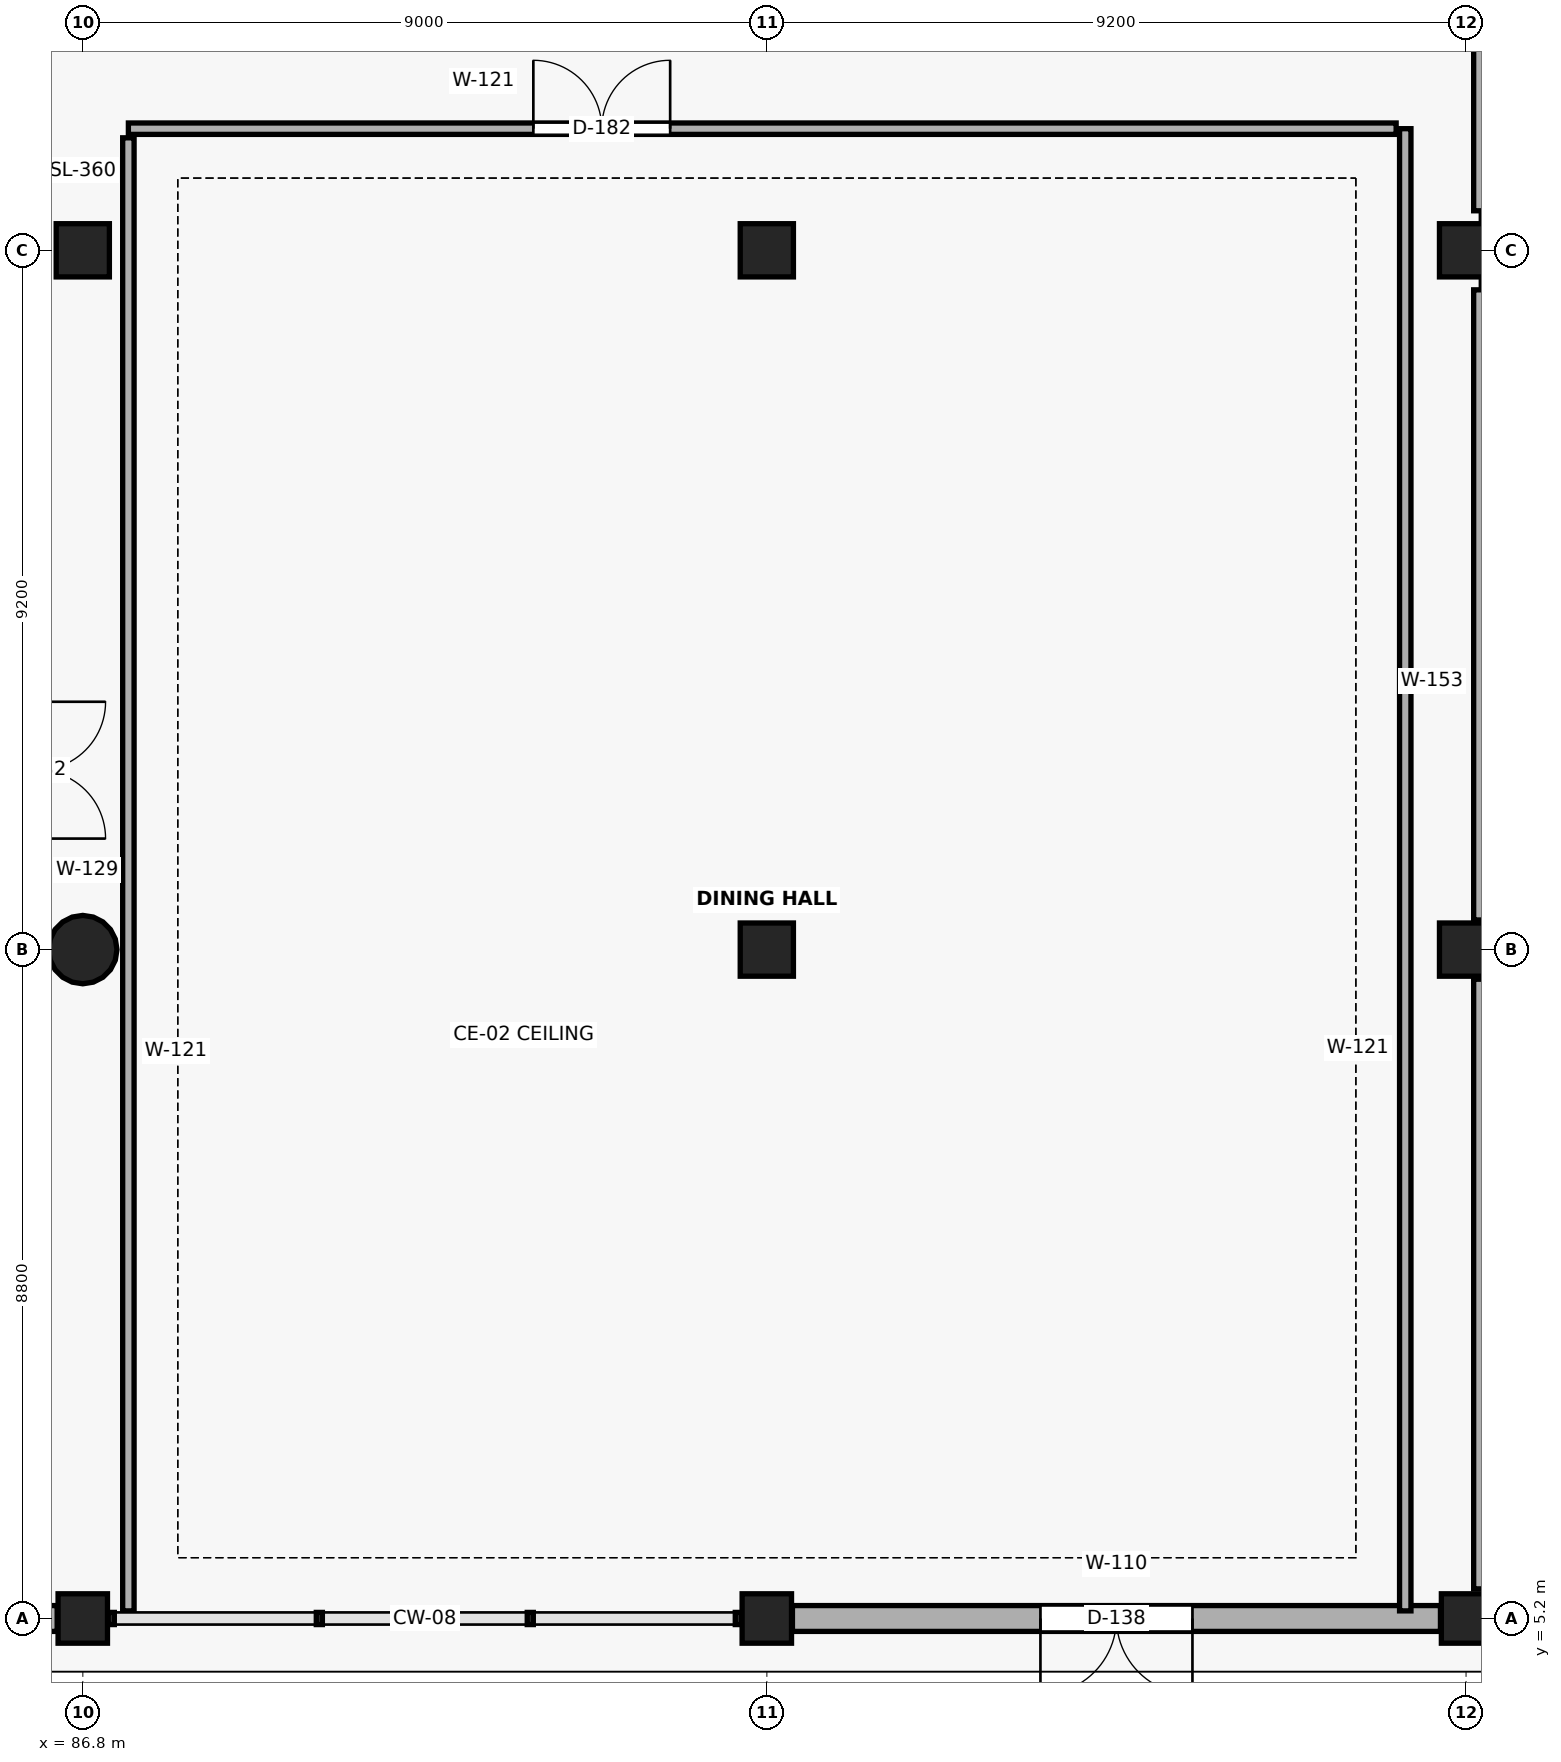
"""IFC4 building model, lengths in metres.
Left out: names, types, materials, properties, quantities, classifications, styles, units other than length and angle.
Written with IfcOpenShell. Run it as: python <this file> out.ifc"""

import sys

from ifc_helpers import new_model, si_unit, direction, frame, frame_2d, origin, origin_2d, place, context, subcontext, project, spatial, rectangle, circle, extrude, element, fill, save


model = new_model("IFC4")
c1 = context("Model", 3, precision=1e-05, world=origin(), true_north=direction((0.0, 1.0)))
c2 = subcontext(c1, "Body", "Model", "MODEL_VIEW")
j1 = project(units=[si_unit("LENGTHUNIT", "METRE"), si_unit("PLANEANGLEUNIT", "RADIAN")], contexts=[c1])
p1 = place(None, origin())
s1 = spatial("IfcSite", under=j1, at=p1, CompositionType="ELEMENT")
p2 = place(p1, origin())
s2 = spatial("IfcBuilding", under=s1, at=p2, CompositionType="ELEMENT")
p3 = place(p2, origin())
s3 = spatial("IfcBuildingStorey", under=s2, at=p3, CompositionType="ELEMENT", Elevation=0.0)
p4 = place(p3, frame((86.8, 5.2, 0.0), z_axis=(0.0, 0.0, 1.0), x_axis=(1.0, 0.0, 0.0)))
e1 = element("IfcColumn", 1, at=p4, inside=s3, PredefinedType="COLUMN", context=c2, shape_type="SweptSolid", body=[
    extrude(rectangle(XDim=0.65, YDim=0.65, at=origin_2d()), origin(), (0.0, 0.0, 1.0), 5.1),
])
p5 = place(p3, frame((86.8, 14.0, 0.0), z_axis=(0.0, 0.0, 1.0), x_axis=(1.0, 0.0, 0.0)))
e2 = element("IfcColumn", 2, at=p5, inside=s3, PredefinedType="COLUMN", context=c2, shape_type="SweptSolid", body=[
    extrude(circle(Radius=0.45, at=origin_2d()), origin(), (0.0, 0.0, 1.0), 5.1),
])
p6 = place(p3, frame((86.8, 23.2, 0.0), z_axis=(0.0, 0.0, 1.0), x_axis=(1.0, 0.0, 0.0)))
e3 = element("IfcColumn", 3, at=p6, inside=s3, PredefinedType="COLUMN", context=c2, shape_type="SweptSolid", body=[
    extrude(rectangle(XDim=0.7, YDim=0.7, at=origin_2d()), origin(), (0.0, 0.0, 1.0), 5.1),
])
p7 = place(p3, frame((95.8, 5.2, 0.0), z_axis=(0.0, 0.0, 1.0), x_axis=(1.0, 0.0, 0.0)))
e4 = element("IfcColumn", 4, at=p7, inside=s3, PredefinedType="COLUMN", context=c2, shape_type="SweptSolid", body=[
    extrude(rectangle(XDim=0.65, YDim=0.65, at=origin_2d()), origin(), (0.0, 0.0, 1.0), 5.1),
])
for number, where, z_axis, x_axis in (
    (5, (95.8, 14.0, 0.0), (0.0, 0.0, 1.0), (1.0, 0.0, 0.0)),
    (6, (95.8, 23.2, 0.0), (0.0, 0.0, 1.0), (1.0, 0.0, 0.0)),
):
    element("IfcColumn", number, at=place(p3, frame(where, z_axis=z_axis, x_axis=x_axis)), inside=s3, PredefinedType="COLUMN", context=c2, shape_type="SweptSolid", body=[
        extrude(rectangle(XDim=0.7, YDim=0.7, at=origin_2d()), origin(), (0.0, 0.0, 1.0), 5.1),
    ])
p8 = place(p3, frame((105.0, 5.2, 0.0), z_axis=(0.0, 0.0, 1.0), x_axis=(1.0, 0.0, 0.0)))
e7 = element("IfcColumn", 7, at=p8, inside=s3, PredefinedType="COLUMN", context=c2, shape_type="SweptSolid", body=[
    extrude(rectangle(XDim=0.65, YDim=0.65, at=origin_2d()), origin(), (0.0, 0.0, 1.0), 5.1),
])
for number, where, z_axis, x_axis in (
    (8, (105.0, 14.0, 0.0), (0.0, 0.0, 1.0), (1.0, 0.0, 0.0)),
    (9, (105.0, 23.2, 0.0), (0.0, 0.0, 1.0), (1.0, 0.0, 0.0)),
):
    element("IfcColumn", number, at=place(p3, frame(where, z_axis=z_axis, x_axis=x_axis)), inside=s3, PredefinedType="COLUMN", context=c2, shape_type="SweptSolid", body=[
        extrude(rectangle(XDim=0.7, YDim=0.7, at=origin_2d()), origin(), (0.0, 0.0, 1.0), 5.1),
    ])
p9 = place(p3, frame((86.463, 5.2, 0.0), z_axis=(0.0, 0.0, 1.0), x_axis=(-1.0, 0.0, 0.0)))
e10 = element("IfcWall", 10, at=p9, inside=s3, PredefinedType="SOLIDWALL", context=c2, shape_type="SweptSolid", body=[
    extrude(rectangle(XDim=8.326, YDim=0.34, at=frame_2d((4.163, 0.0))), origin(), (0.0, 0.0, 1.0), 3.94),
])
p10 = place(p9, frame((3.013, 0.0, 0.0)))
e11 = element("IfcOpeningElement", 11, at=p10, cuts=e10, PredefinedType="OPENING", context=c2, shape_type="SweptSolid", body=[
    extrude(rectangle(XDim=2.3, YDim=2.55, at=frame_2d((1.15, 1.275))), frame((0.0, 0.182, 0.0), z_axis=(0.0, -1.0, 0.0), x_axis=(1.0, 0.0, 0.0)), (0.0, 0.0, 1.0), 0.364),
])
p11 = place(p3, frame((104.663, 5.2, 0.0), z_axis=(0.0, 0.0, 1.0), x_axis=(-1.0, 0.0, 0.0)))
e12 = element("IfcWall", 12, at=p11, inside=s3, PredefinedType="SOLIDWALL", context=c2, shape_type="SweptSolid", body=[
    extrude(rectangle(XDim=8.526, YDim=0.34, at=frame_2d((4.263, 0.0))), origin(), (0.0, 0.0, 1.0), 3.94),
])
p12 = place(p11, frame((3.263, 0.0, 0.0)))
e13 = element("IfcOpeningElement", 13, at=p12, cuts=e12, PredefinedType="OPENING", context=c2, shape_type="SweptSolid", body=[
    extrude(rectangle(XDim=2.0, YDim=2.45, at=frame_2d((1.0, 1.225))), frame((0.0, 0.182, 0.0), z_axis=(0.0, -1.0, 0.0), x_axis=(1.0, 0.0, 0.0)), (0.0, 0.0, 1.0), 0.364),
])
p13 = place(p3, frame((104.2, 5.3, 0.0), z_axis=(0.0, 0.0, 1.0), x_axis=(0.0, 1.0, 0.0)))
e14 = element("IfcWall", 14, at=p13, inside=s3, PredefinedType="PARTITIONING", context=c2, shape_type="SweptSolid", body=[
    extrude(rectangle(XDim=19.5, YDim=0.15, at=frame_2d((9.75, 0.0))), origin(), (0.0, 0.0, 1.0), 4.8),
])
p14 = place(p3, frame((87.4, 24.8, 0.0), z_axis=(0.0, 0.0, 1.0), x_axis=(1.0, 0.0, 0.0)))
e15 = element("IfcWall", 15, at=p14, inside=s3, PredefinedType="PARTITIONING", context=c2, shape_type="SweptSolid", body=[
    extrude(rectangle(XDim=16.68, YDim=0.15, at=frame_2d((8.34, 0.0))), origin(), (0.0, 0.0, 1.0), 4.8),
])
p15 = place(p14, frame((5.328, 0.0, 0.0)))
e16 = element("IfcOpeningElement", 16, at=p15, cuts=e15, PredefinedType="OPENING", context=c2, shape_type="SweptSolid", body=[
    extrude(rectangle(XDim=1.8, YDim=2.45, at=frame_2d((0.9, 1.225))), frame((0.0, 0.087, 0.0), z_axis=(0.0, -1.0, 0.0), x_axis=(1.0, 0.0, 0.0)), (0.0, 0.0, 1.0), 0.174),
])
p16 = place(p3, frame((87.4, 24.68, 0.0), z_axis=(0.0, 0.0, 1.0), x_axis=(0.0, -1.0, 0.0)))
e17 = element("IfcWall", 17, at=p16, inside=s3, PredefinedType="PARTITIONING", context=c2, shape_type="SweptSolid", body=[
    extrude(rectangle(XDim=19.38, YDim=0.15, at=frame_2d((9.69, 0.0))), origin(), (0.0, 0.0, 1.0), 4.8),
])
p17 = place(p3, frame((105.2, 22.68, 0.0), z_axis=(0.0, 0.0, 1.0), x_axis=(0.0, -1.0, 0.0)))
e18 = element("IfcWall", 18, at=p17, inside=s3, PredefinedType="STANDARD", context=c2, shape_type="SweptSolid", body=[
    extrude(rectangle(XDim=8.29, YDim=0.2, at=frame_2d((4.145, 0.0))), origin(), (0.0, 0.0, 1.0), 4.1),
])
p18 = place(p3, frame((105.2, 13.61, 0.0), z_axis=(0.0, 0.0, 1.0), x_axis=(0.0, -1.0, 0.0)))
e19 = element("IfcWall", 19, at=p18, inside=s3, PredefinedType="STANDARD", context=c2, shape_type="SweptSolid", body=[
    extrude(rectangle(XDim=8.021, YDim=0.2, at=frame_2d((4.01, 0.0))), origin(), (0.0, 0.0, 1.0), 4.1),
])
p19 = place(p3, frame((105.2, 23.6, 0.0), z_axis=(0.0, 0.0, 1.0), x_axis=(1.0, 0.0, 0.0)))
e20 = element("IfcWall", 20, at=p19, inside=s3, PredefinedType="STANDARD", context=c2, shape_type="SweptSolid", body=[
    extrude(rectangle(XDim=8.82, YDim=0.2, at=frame_2d((4.41, 0.0))), origin(), (0.0, 0.0, 1.0), 4.8),
])
p20 = place(p3, frame((105.2, 23.72, 0.0), z_axis=(0.0, 0.0, 1.0), x_axis=(0.0, 1.0, 0.0)))
e21 = element("IfcWall", 21, at=p20, inside=s3, PredefinedType="STANDARD", context=c2, shape_type="SweptSolid", body=[
    extrude(rectangle(XDim=7.56, YDim=0.2, at=frame_2d((3.78, 0.0))), origin(), (0.0, 0.0, 1.0), 4.1),
])
p21 = place(p20, frame((2.351, 0.0, 0.0)))
e22 = element("IfcOpeningElement", 22, at=p21, cuts=e21, PredefinedType="OPENING", context=c2, shape_type="SweptSolid", body=[
    extrude(rectangle(XDim=1.15, YDim=2.2, at=frame_2d((0.575, 1.1))), frame((0.0, 0.112, 0.0), z_axis=(0.0, -1.0, 0.0), x_axis=(1.0, 0.0, 0.0)), (0.0, 0.0, 1.0), 0.224),
])
p22 = place(p12, origin())
e23 = element("IfcDoor", 23, at=p22, inside=s3, OperationType="DOUBLE_DOOR_SINGLE_SWING", PredefinedType="DOOR", context=c2, shape_type="SweptSolid", body=[
    extrude(rectangle(XDim=2.0, YDim=2.45, at=frame_2d((1.0, 1.225))), frame((0.0, 0.025, 0.0), z_axis=(0.0, -1.0, 0.0), x_axis=(1.0, 0.0, 0.0)), (0.0, 0.0, 1.0), 0.05),
])
fill(e13, e23)
p23 = place(p15, origin())
e24 = element("IfcDoor", 24, at=p23, inside=s3, OperationType="DOUBLE_DOOR_SINGLE_SWING", PredefinedType="DOOR", context=c2, shape_type="SweptSolid", body=[
    extrude(rectangle(XDim=1.8, YDim=2.45, at=frame_2d((0.9, 1.225))), frame((0.0, 0.025, 0.0), z_axis=(0.0, -1.0, 0.0), x_axis=(1.0, 0.0, 0.0)), (0.0, 0.0, 1.0), 0.05),
])
fill(e16, e24)
save(model, sys.argv[1])
